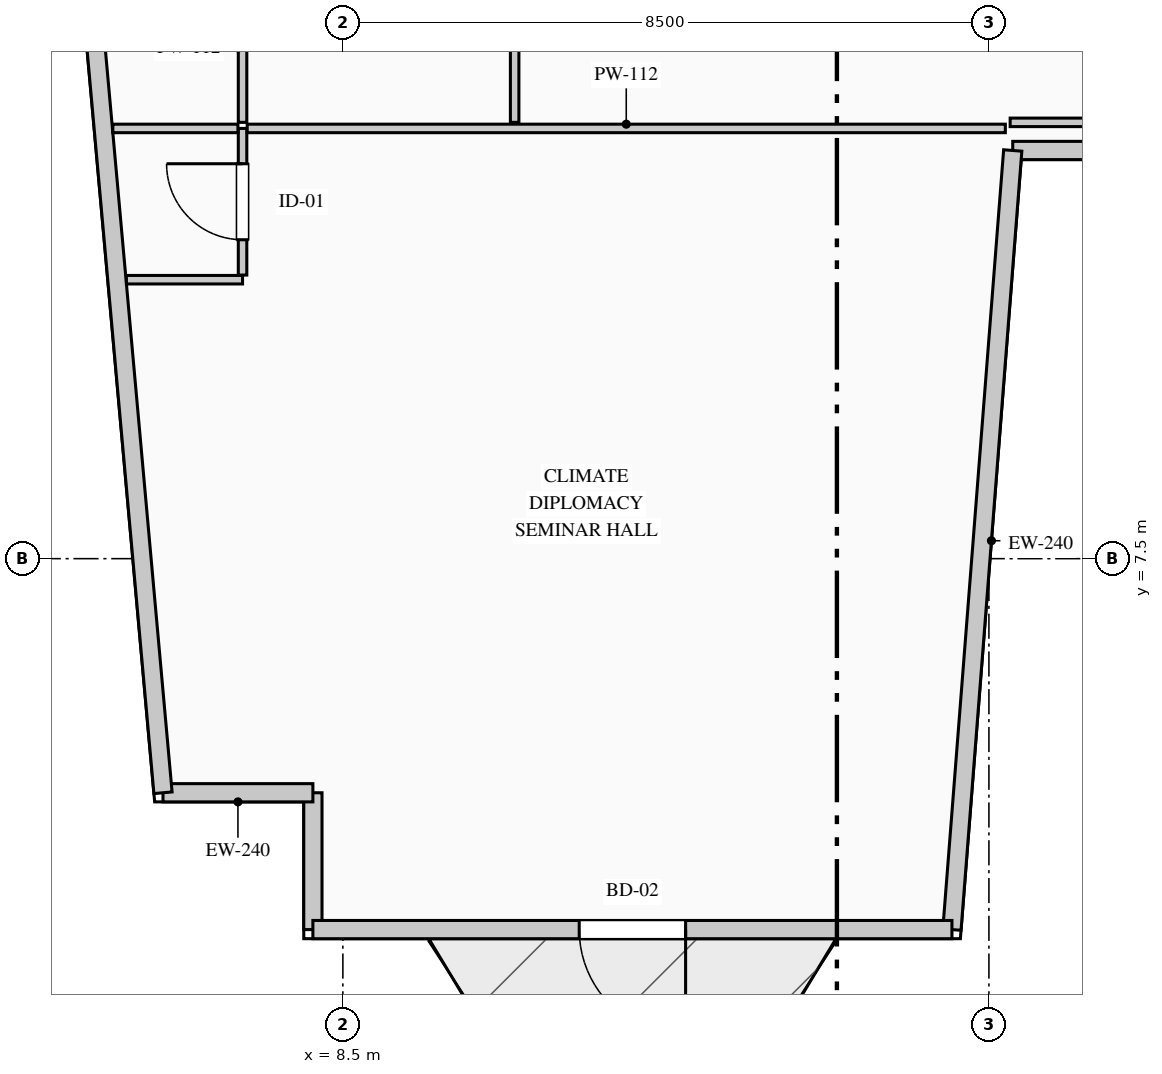
"""IFC4 building model, lengths in metres.
Left out: names, types, materials, properties, quantities, classifications, styles, units other than length and angle.
Written with IfcOpenShell. Run it as: python <this file> out.ifc"""

import sys

from ifc_helpers import new_model, si_unit, direction, frame, frame_2d, origin, place, context, subcontext, project, spatial, rectangle, extrude, element, fill, save


model = new_model("IFC4")
c1 = context("Model", 3, precision=1e-05, world=origin(), true_north=direction((0.0, 1.0)))
c2 = subcontext(c1, "Body", "Model", "MODEL_VIEW")
j1 = project(units=[si_unit("LENGTHUNIT", "METRE"), si_unit("PLANEANGLEUNIT", "RADIAN")], contexts=[c1])
p1 = place(None, origin())
s1 = spatial("IfcSite", under=j1, at=p1, CompositionType="ELEMENT")
p2 = place(p1, origin())
s2 = spatial("IfcBuilding", under=s1, at=p2, CompositionType="ELEMENT")
p3 = place(p2, frame((0.0, 0.0, 268.55)))
s3 = spatial("IfcBuildingStorey", under=s2, at=p3, CompositionType="ELEMENT", Elevation=268.55)
p4 = place(p3, frame((8.105, 2.62, 0.0), z_axis=(0.0, 0.0, 1.0), x_axis=(0.0, 1.0, 0.0)))
e1 = element("IfcWall", 1, at=p4, inside=s3, PredefinedType="STANDARD", context=c2, shape_type="SweptSolid", body=[
    extrude(rectangle(XDim=1.8, YDim=0.24, at=frame_2d((0.9, 0.0))), origin(), (0.0, 0.0, 1.0), 3.7),
])
p5 = place(p3, frame((8.105, 4.42, 0.0), z_axis=(0.0, 0.0, 1.0), x_axis=(-1.0, 0.0, 0.0)))
e2 = element("IfcWall", 2, at=p5, inside=s3, PredefinedType="STANDARD", context=c2, shape_type="SweptSolid", body=[
    extrude(rectangle(XDim=1.972, YDim=0.24, at=frame_2d((0.986, 0.0))), origin(), (0.0, 0.0, 1.0), 3.7),
])
p6 = place(p3, frame((6.133, 4.42, 0.0), z_axis=(0.0, 0.0, 1.0), x_axis=(-0.089522678378, 0.995984784048, 0.0)))
e3 = element("IfcWall", 3, at=p6, inside=s3, PredefinedType="STANDARD", context=c2, shape_type="SweptSolid", body=[
    extrude(rectangle(XDim=37.31, YDim=0.24, at=frame_2d((18.655, 0.0))), origin(), (0.0, 0.0, 1.0), 3.7),
])
p7 = place(p6, frame((10.246, 0.0, 0.9)))
e4 = element("IfcOpeningElement", 4, at=p7, cuts=e3, PredefinedType="OPENING", context=c2, shape_type="SweptSolid", body=[
    extrude(rectangle(XDim=1.65, YDim=1.95, at=frame_2d((0.825, 0.975))), frame((0.0, 0.13, 0.0), z_axis=(0.0, -1.0, 0.0), x_axis=(1.0, 0.0, 0.0)), (0.0, 0.0, 1.0), 0.26),
])
p8 = place(p3, frame((21.867, 12.87, 0.0), z_axis=(0.0, 0.0, 1.0), x_axis=(-1.0, 0.0, 0.0)))
e5 = element("IfcWall", 5, at=p8, inside=s3, PredefinedType="STANDARD", context=c2, shape_type="SweptSolid", body=[
    extrude(rectangle(XDim=4.553, YDim=0.24, at=frame_2d((2.277, 0.0))), origin(), (0.0, 0.0, 1.0), 3.7),
])
p9 = place(p3, frame((17.313, 12.87, 0.0), z_axis=(0.0, 0.0, 1.0), x_axis=(-0.077816860153, -0.996967670627, 0.0)))
e6 = element("IfcWall", 6, at=p9, inside=s3, PredefinedType="STANDARD", context=c2, shape_type="SweptSolid", body=[
    extrude(rectangle(XDim=10.281, YDim=0.24, at=frame_2d((5.141, 0.0))), origin(), (0.0, 0.0, 1.0), 3.7),
])
p10 = place(p3, frame((16.513, 2.62, 0.0), z_axis=(0.0, 0.0, 1.0), x_axis=(-1.0, 0.0, 0.0)))
e7 = element("IfcWall", 7, at=p10, inside=s3, PredefinedType="STANDARD", context=c2, shape_type="SweptSolid", body=[
    extrude(rectangle(XDim=8.408, YDim=0.24, at=frame_2d((4.204, 0.0))), origin(), (0.0, 0.0, 1.0), 3.7),
])
p11 = place(p10, frame((3.504, 0.0, 0.0)))
e8 = element("IfcOpeningElement", 8, at=p11, cuts=e7, PredefinedType="OPENING", context=c2, shape_type="SweptSolid", body=[
    extrude(rectangle(XDim=1.4, YDim=2.2, at=frame_2d((0.7, 1.1))), frame((0.0, 0.13, 0.0), z_axis=(0.0, -1.0, 0.0), x_axis=(1.0, 0.0, 0.0)), (0.0, 0.0, 1.0), 0.26),
])
p12 = place(p3, frame((5.652, 11.17, 0.0), z_axis=(0.0, 0.0, 1.0), x_axis=(1.0, 0.0, 0.0)))
e9 = element("IfcWall", 9, at=p12, inside=s3, PredefinedType="PARTITIONING", context=c2, shape_type="SweptSolid", body=[
    extrude(rectangle(XDim=1.528, YDim=0.112, at=frame_2d((0.764, 0.0))), origin(), (0.0, 0.0, 1.0), 3.7),
])
p13 = place(p3, frame((7.18, 11.231, 0.0), z_axis=(0.0, 0.0, 1.0), x_axis=(0.0, 1.0, 0.0)))
e10 = element("IfcWall", 10, at=p13, inside=s3, PredefinedType="PARTITIONING", context=c2, shape_type="SweptSolid", body=[
    extrude(rectangle(XDim=1.929, YDim=0.112, at=frame_2d((0.964, 0.0))), origin(), (0.0, 0.0, 1.0), 3.7),
])
p14 = place(p13, frame((0.465, 0.0, 0.0)))
e11 = element("IfcOpeningElement", 11, at=p14, cuts=e10, PredefinedType="OPENING", context=c2, shape_type="SweptSolid", body=[
    extrude(rectangle(XDim=1.0, YDim=2.15, at=frame_2d((0.5, 1.075))), frame((0.0, 0.066, 0.0), z_axis=(0.0, -1.0, 0.0), x_axis=(1.0, 0.0, 0.0)), (0.0, 0.0, 1.0), 0.132),
])
p15 = place(p3, frame((5.473, 13.16, 0.0), z_axis=(0.0, 0.0, 1.0), x_axis=(1.0, 0.0, 0.0)))
e12 = element("IfcWall", 12, at=p15, inside=s3, PredefinedType="PARTITIONING", context=c2, shape_type="SweptSolid", body=[
    extrude(rectangle(XDim=1.646, YDim=0.112, at=frame_2d((0.823, 0.0))), origin(), (0.0, 0.0, 1.0), 3.7),
])
p16 = place(p3, frame((7.241, 13.16, 0.0), z_axis=(0.0, 0.0, 1.0), x_axis=(1.0, 0.0, 0.0)))
e13 = element("IfcWall", 13, at=p16, inside=s3, PredefinedType="PARTITIONING", context=c2, shape_type="SweptSolid", body=[
    extrude(rectangle(XDim=9.975, YDim=0.112, at=frame_2d((4.988, 0.0))), origin(), (0.0, 0.0, 1.0), 3.7),
])
p17 = place(p3, frame((7.18, 13.24, 0.0), z_axis=(0.0, 0.0, 1.0), x_axis=(0.0, 1.0, 0.0)))
e14 = element("IfcWall", 14, at=p17, inside=s3, PredefinedType="PARTITIONING", context=c2, shape_type="SweptSolid", body=[
    extrude(rectangle(XDim=4.7, YDim=0.112, at=frame_2d((2.35, 0.0))), origin(), (0.0, 0.0, 1.0), 3.7),
])
p18 = place(p17, frame((2.404, 0.0, 0.0)))
e15 = element("IfcOpeningElement", 15, at=p18, cuts=e14, PredefinedType="OPENING", context=c2, shape_type="SweptSolid", body=[
    extrude(rectangle(XDim=1.0, YDim=2.15, at=frame_2d((0.5, 1.075))), frame((0.0, 0.066, 0.0), z_axis=(0.0, -1.0, 0.0), x_axis=(1.0, 0.0, 0.0)), (0.0, 0.0, 1.0), 0.132),
])
p19 = place(p3, frame((10.76, 17.879, 0.0), z_axis=(0.0, 0.0, 1.0), x_axis=(0.0, -1.0, 0.0)))
e16 = element("IfcWall", 16, at=p19, inside=s3, PredefinedType="PARTITIONING", context=c2, shape_type="SweptSolid", body=[
    extrude(rectangle(XDim=4.639, YDim=0.112, at=frame_2d((2.319, 0.0))), origin(), (0.0, 0.0, 1.0), 3.7),
])
p20 = place(p3, frame((18.329, 13.24, 0.0), z_axis=(0.0, 0.0, 1.0), x_axis=(-1.0, 0.0, 0.0)))
e17 = element("IfcWall", 17, at=p20, inside=s3, PredefinedType="PARTITIONING", context=c2, shape_type="SweptSolid", body=[
    extrude(rectangle(XDim=1.05, YDim=0.112, at=frame_2d((0.525, 0.0))), origin(), (0.0, 0.0, 1.0), 3.7),
])
p21 = place(p11, origin())
e18 = element("IfcDoor", 18, at=p21, inside=s3, OperationType="SINGLE_SWING_LEFT", PredefinedType="DOOR", context=c2, shape_type="SweptSolid", body=[
    extrude(rectangle(XDim=1.4, YDim=2.2, at=frame_2d((0.7, 1.1))), frame((0.0, 0.025, 0.0), z_axis=(0.0, -1.0, 0.0), x_axis=(1.0, 0.0, 0.0)), (0.0, 0.0, 1.0), 0.05),
])
fill(e8, e18)
p22 = place(p14, origin())
e19 = element("IfcDoor", 19, at=p22, inside=s3, OperationType="SINGLE_SWING_RIGHT", PredefinedType="DOOR", context=c2, shape_type="SweptSolid", body=[
    extrude(rectangle(XDim=1.0, YDim=2.15, at=frame_2d((0.5, 1.075))), frame((0.0, 0.025, 0.0), z_axis=(0.0, -1.0, 0.0), x_axis=(1.0, 0.0, 0.0)), (0.0, 0.0, 1.0), 0.05),
])
fill(e11, e19)
save(model, sys.argv[1])
